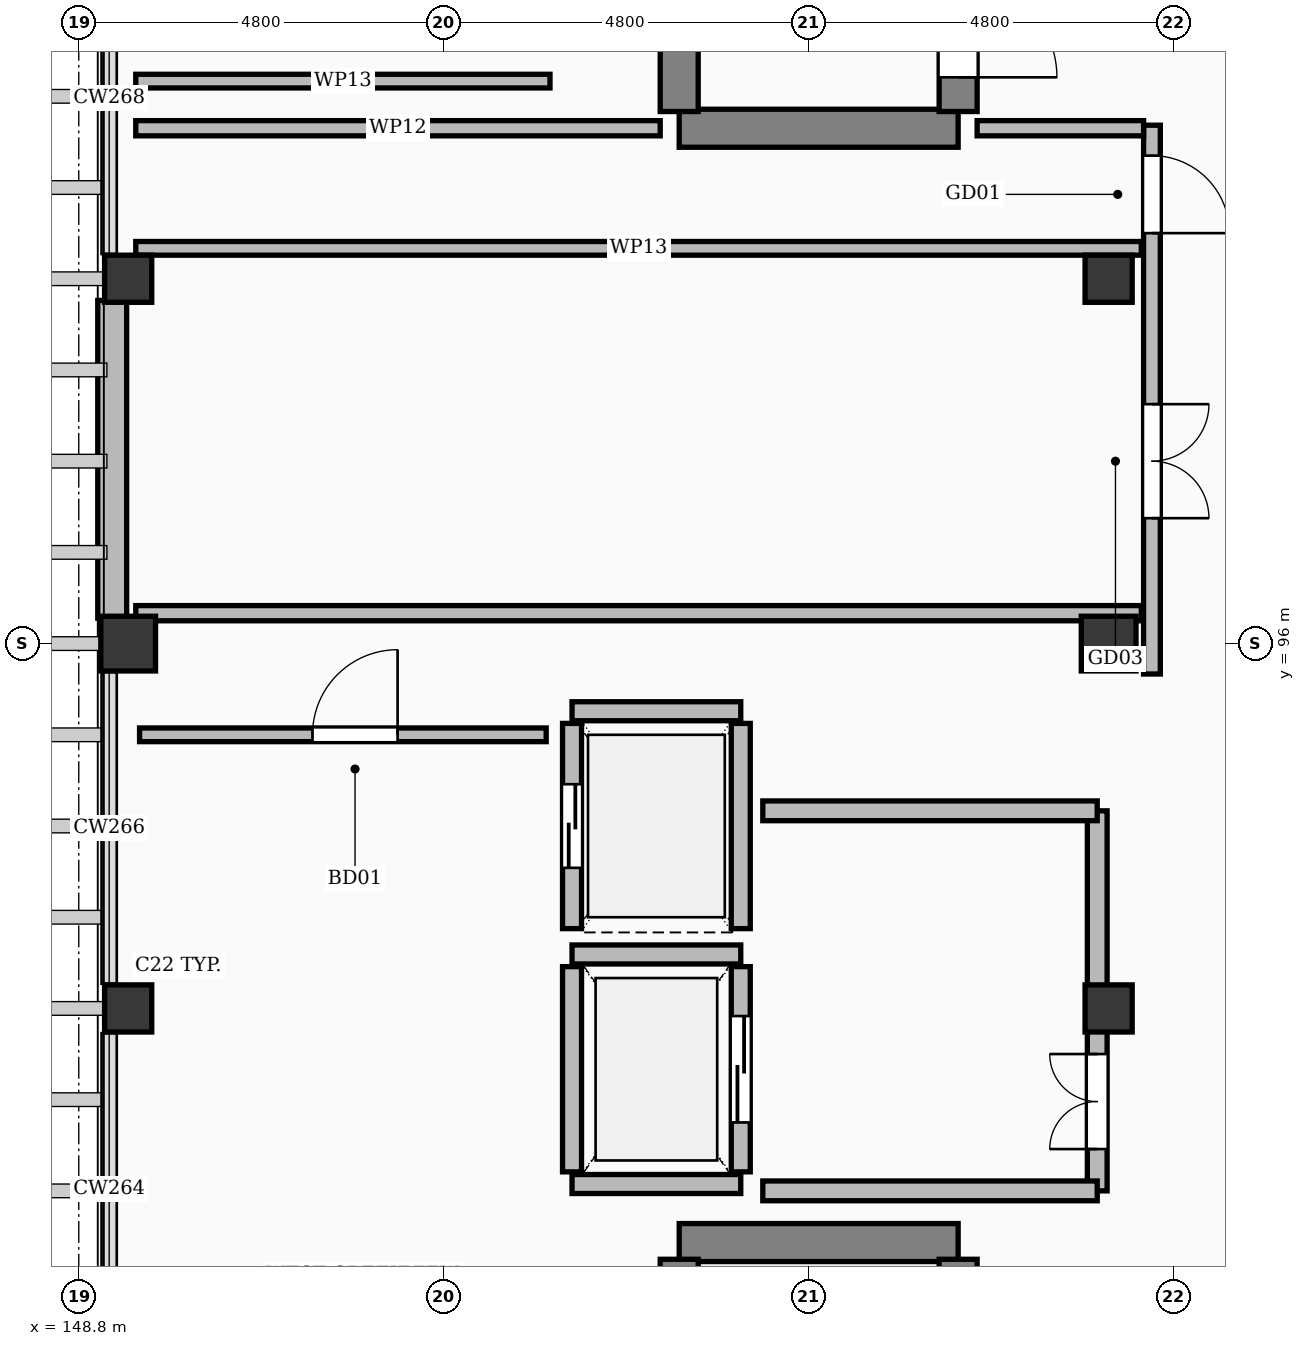
"""IFC4 building model, lengths in metres.
Left out: names, types, materials, properties, quantities, classifications, styles, units other than length and angle.
Written with IfcOpenShell. Run it as: python <this file> out.ifc"""

import sys

from ifc_helpers import new_model, si_unit, direction, frame, frame_2d, origin, origin_2d, place, context, subcontext, project, spatial, rectangle, extrude, element, fill, save


model = new_model("IFC4")
c1 = context("Model", 3, precision=1e-05, world=origin(), true_north=direction((0.0, 1.0)))
c2 = subcontext(c1, "Body", "Model", "MODEL_VIEW")
j1 = project(units=[si_unit("LENGTHUNIT", "METRE"), si_unit("PLANEANGLEUNIT", "RADIAN")], contexts=[c1])
p1 = place(None, origin())
s1 = spatial("IfcSite", under=j1, at=p1, CompositionType="ELEMENT")
p2 = place(p1, origin())
s2 = spatial("IfcBuilding", under=s1, at=p2, CompositionType="ELEMENT")
p3 = place(p2, frame((0.0, 0.0, 31.8)))
s3 = spatial("IfcBuildingStorey", under=s2, at=p3, CompositionType="ELEMENT", Elevation=31.8)
for number, where, z_axis, x_axis in (
    (1, (149.45, 96.0, 0.0), (0.0, 0.0, 1.0), (1.0, 0.0, 0.0)),
    (2, (162.35, 96.0, 0.0), (0.0, 0.0, 1.0), (1.0, 0.0, 0.0)),
):
    element("IfcColumn", number, at=place(p3, frame(where, z_axis=z_axis, x_axis=x_axis)), inside=s3, PredefinedType="COLUMN", context=c2, shape_type="SweptSolid", body=[
        extrude(rectangle(XDim=0.72, YDim=0.72, at=origin_2d()), origin(), (0.0, 0.0, 1.0), 3.6),
    ])
for number, where, z_axis, x_axis in (
    (3, (149.45, 91.2, 0.0), (0.0, 0.0, 1.0), (1.0, 0.0, 0.0)),
    (4, (149.45, 100.8, 0.0), (0.0, 0.0, 1.0), (1.0, 0.0, 0.0)),
    (5, (162.35, 91.2, 0.0), (0.0, 0.0, 1.0), (1.0, 0.0, 0.0)),
    (6, (162.35, 100.8, 0.0), (0.0, 0.0, 1.0), (1.0, 0.0, 0.0)),
):
    element("IfcColumn", number, at=place(p3, frame(where, z_axis=z_axis, x_axis=x_axis)), inside=s3, PredefinedType="COLUMN", context=c2, shape_type="SweptSolid", body=[
        extrude(rectangle(XDim=0.62, YDim=0.62, at=origin_2d()), origin(), (0.0, 0.0, 1.0), 3.6),
    ])
p4 = place(p3, frame((149.24, 96.335, 0.0), z_axis=(0.0, 0.0, 1.0), x_axis=(0.0, 1.0, 0.0)))
e7 = element("IfcWall", 7, at=p4, inside=s3, PredefinedType="SOLIDWALL", context=c2, shape_type="SweptSolid", body=[
    extrude(rectangle(XDim=4.18, YDim=0.38, at=frame_2d((2.09, 0.0))), origin(), (0.0, 0.0, 1.0), 2.732),
])
p5 = place(p3, frame((156.7, 88.12, 0.0), z_axis=(0.0, 0.0, 1.0), x_axis=(1.0, 0.0, 0.0)))
e8 = element("IfcWall", 8, at=p5, inside=s3, PredefinedType="SHEAR", context=c2, shape_type="SweptSolid", body=[
    extrude(rectangle(XDim=3.67, YDim=0.5, at=frame_2d((1.835, 0.0))), origin(), (0.0, 0.0, 1.0), 3.36),
])
p6 = place(p3, frame((156.7, 77.4, 0.0), z_axis=(0.0, 0.0, 1.0), x_axis=(0.0, 1.0, 0.0)))
e9 = element("IfcWall", 9, at=p6, inside=s3, PredefinedType="SHEAR", context=c2, shape_type="SweptSolid", body=[
    extrude(rectangle(XDim=10.5, YDim=0.5, at=frame_2d((5.25, 0.0))), origin(), (0.0, 0.0, 1.0), 3.36),
])
p7 = place(p3, frame((160.37, 77.4, 0.0), z_axis=(0.0, 0.0, 1.0), x_axis=(0.0, 1.0, 0.0)))
e10 = element("IfcWall", 10, at=p7, inside=s3, PredefinedType="SHEAR", context=c2, shape_type="SweptSolid", body=[
    extrude(rectangle(XDim=10.5, YDim=0.5, at=frame_2d((5.25, 0.0))), origin(), (0.0, 0.0, 1.0), 3.36),
])
p8 = place(p7, frame((0.45, 0.0, 0.0)))
e11 = element("IfcOpeningElement", 11, at=p8, cuts=e10, PredefinedType="OPENING", context=c2, shape_type="SweptSolid", body=[
    extrude(rectangle(XDim=1.3, YDim=2.15, at=frame_2d((0.65, 1.075))), frame((0.0, 0.262, 0.0), z_axis=(0.0, -1.0, 0.0), x_axis=(1.0, 0.0, 0.0)), (0.0, 0.0, 1.0), 0.524),
])
for number, where, z_axis, x_axis in (
    (12, (155.29, 88.89, 0.0), (0.0, 0.0, 1.0), (1.0, 0.0, 0.0)),
    (13, (155.29, 91.91, 0.0), (0.0, 0.0, 1.0), (1.0, 0.0, 0.0)),
):
    element("IfcWall", number, at=place(p3, frame(where, z_axis=z_axis, x_axis=x_axis)), inside=s3, PredefinedType="SOLIDWALL", context=c2, shape_type="SweptSolid", body=[
        extrude(rectangle(XDim=2.22, YDim=0.25, at=frame_2d((1.11, 0.0))), origin(), (0.0, 0.0, 1.0), 3.36),
    ])
p9 = place(p3, frame((155.29, 89.05, 0.0), z_axis=(0.0, 0.0, 1.0), x_axis=(0.0, 1.0, 0.0)))
e14 = element("IfcWall", 14, at=p9, inside=s3, PredefinedType="SOLIDWALL", context=c2, shape_type="SweptSolid", body=[
    extrude(rectangle(XDim=2.7, YDim=0.25, at=frame_2d((1.35, 0.0))), origin(), (0.0, 0.0, 1.0), 2.732),
])
p10 = place(p3, frame((157.51, 89.05, 0.0), z_axis=(0.0, 0.0, 1.0), x_axis=(0.0, 1.0, 0.0)))
e15 = element("IfcWall", 15, at=p10, inside=s3, PredefinedType="SOLIDWALL", context=c2, shape_type="SweptSolid", body=[
    extrude(rectangle(XDim=2.7, YDim=0.25, at=frame_2d((1.35, 0.0))), origin(), (0.0, 0.0, 1.0), 2.732),
])
p11 = place(p10, frame((0.65, 0.0, 0.0)))
e16 = element("IfcOpeningElement", 16, at=p11, cuts=e15, PredefinedType="OPENING", context=c2, shape_type="SweptSolid", body=[
    extrude(rectangle(XDim=1.4, YDim=2.3, at=frame_2d((0.7, 1.15))), frame((0.0, 0.137, 0.0), z_axis=(0.0, -1.0, 0.0), x_axis=(1.0, 0.0, 0.0)), (0.0, 0.0, 1.0), 0.274),
])
p12 = place(p3, frame((155.29, 95.11, 0.0), z_axis=(0.0, 0.0, 1.0), x_axis=(1.0, 0.0, 0.0)))
e17 = element("IfcWall", 17, at=p12, inside=s3, PredefinedType="SOLIDWALL", context=c2, shape_type="SweptSolid", body=[
    extrude(rectangle(XDim=2.22, YDim=0.25, at=frame_2d((1.11, 0.0))), origin(), (0.0, 0.0, 1.0), 3.36),
])
p13 = place(p3, frame((155.29, 92.25, 0.0), z_axis=(0.0, 0.0, 1.0), x_axis=(0.0, 1.0, 0.0)))
e18 = element("IfcWall", 18, at=p13, inside=s3, PredefinedType="SOLIDWALL", context=c2, shape_type="SweptSolid", body=[
    extrude(rectangle(XDim=2.7, YDim=0.25, at=frame_2d((1.35, 0.0))), origin(), (0.0, 0.0, 1.0), 3.36),
])
p14 = place(p13, frame((0.8, 0.0, 0.0)))
e19 = element("IfcOpeningElement", 19, at=p14, cuts=e18, PredefinedType="OPENING", context=c2, shape_type="SweptSolid", body=[
    extrude(rectangle(XDim=1.1, YDim=2.2, at=frame_2d((0.55, 1.1))), frame((0.0, 0.137, 0.0), z_axis=(0.0, -1.0, 0.0), x_axis=(1.0, 0.0, 0.0)), (0.0, 0.0, 1.0), 0.274),
])
p15 = place(p3, frame((157.51, 92.25, 0.0), z_axis=(0.0, 0.0, 1.0), x_axis=(0.0, 1.0, 0.0)))
e20 = element("IfcWall", 20, at=p15, inside=s3, PredefinedType="SOLIDWALL", context=c2, shape_type="SweptSolid", body=[
    extrude(rectangle(XDim=2.7, YDim=0.25, at=frame_2d((1.35, 0.0))), origin(), (0.0, 0.0, 1.0), 3.36),
])
p16 = place(p3, frame((162.2, 88.8, 0.0), z_axis=(0.0, 0.0, 1.0), x_axis=(0.0, 1.0, 0.0)))
e21 = element("IfcWall", 21, at=p16, inside=s3, PredefinedType="SOLIDWALL", context=c2, shape_type="SweptSolid", body=[
    extrude(rectangle(XDim=5.0, YDim=0.26, at=frame_2d((2.5, 0.0))), origin(), (0.0, 0.0, 1.0), 2.732),
])
p17 = place(p16, frame((0.55, 0.0, 0.0)))
e22 = element("IfcOpeningElement", 22, at=p17, cuts=e21, PredefinedType="OPENING", context=c2, shape_type="SweptSolid", body=[
    extrude(rectangle(XDim=1.25, YDim=2.15, at=frame_2d((0.625, 1.075))), frame((0.0, 0.142, 0.0), z_axis=(0.0, -1.0, 0.0), x_axis=(1.0, 0.0, 0.0)), (0.0, 0.0, 1.0), 0.284),
])
for number, where, z_axis, x_axis in (
    (23, (157.8, 88.8, 0.0), (0.0, 0.0, 1.0), (1.0, 0.0, 0.0)),
    (24, (157.8, 93.8, 0.0), (0.0, 0.0, 1.0), (1.0, 0.0, 0.0)),
):
    element("IfcWall", number, at=place(p3, frame(where, z_axis=z_axis, x_axis=x_axis)), inside=s3, PredefinedType="SOLIDWALL", context=c2, shape_type="SweptSolid", body=[
        extrude(rectangle(XDim=4.4, YDim=0.26, at=frame_2d((2.2, 0.0))), origin(), (0.0, 0.0, 1.0), 2.732),
    ])
p18 = place(p3, frame((156.7, 102.78, 0.0), z_axis=(0.0, 0.0, 1.0), x_axis=(1.0, 0.0, 0.0)))
e25 = element("IfcWall", 25, at=p18, inside=s3, PredefinedType="SHEAR", context=c2, shape_type="SweptSolid", body=[
    extrude(rectangle(XDim=3.67, YDim=0.5, at=frame_2d((1.835, 0.0))), origin(), (0.0, 0.0, 1.0), 3.36),
])
p19 = place(p3, frame((156.7, 103.0, 0.0), z_axis=(0.0, 0.0, 1.0), x_axis=(0.0, 1.0, 0.0)))
e26 = element("IfcWall", 26, at=p19, inside=s3, PredefinedType="SHEAR", context=c2, shape_type="SweptSolid", body=[
    extrude(rectangle(XDim=10.5, YDim=0.5, at=frame_2d((5.25, 0.0))), origin(), (0.0, 0.0, 1.0), 3.36),
])
p20 = place(p3, frame((160.37, 103.0, 0.0), z_axis=(0.0, 0.0, 1.0), x_axis=(0.0, 1.0, 0.0)))
e27 = element("IfcWall", 27, at=p20, inside=s3, PredefinedType="SHEAR", context=c2, shape_type="SweptSolid", body=[
    extrude(rectangle(XDim=10.5, YDim=0.5, at=frame_2d((5.25, 0.0))), origin(), (0.0, 0.0, 1.0), 3.36),
])
p21 = place(p20, frame((0.45, 0.0, 0.0)))
e28 = element("IfcOpeningElement", 28, at=p21, cuts=e27, PredefinedType="OPENING", context=c2, shape_type="SweptSolid", body=[
    extrude(rectangle(XDim=1.3, YDim=2.15, at=frame_2d((0.65, 1.075))), frame((0.0, 0.262, 0.0), z_axis=(0.0, -1.0, 0.0), x_axis=(1.0, 0.0, 0.0)), (0.0, 0.0, 1.0), 0.524),
])
p22 = place(p3, frame((162.92, 95.6, 0.0), z_axis=(0.0, 0.0, 1.0), x_axis=(0.0, 1.0, 0.0)))
e29 = element("IfcWall", 29, at=p22, inside=s3, PredefinedType="PARTITIONING", context=c2, shape_type="SweptSolid", body=[
    extrude(rectangle(XDim=7.22, YDim=0.22, at=frame_2d((3.61, 0.0))), origin(), (0.0, 0.0, 1.0), 2.732),
])
p23 = place(p22, frame((2.05, 0.0, 0.0)))
e30 = element("IfcOpeningElement", 30, at=p23, cuts=e29, PredefinedType="OPENING", context=c2, shape_type="SweptSolid", body=[
    extrude(rectangle(XDim=1.5, YDim=2.3, at=frame_2d((0.75, 1.15))), frame((0.0, 0.122, 0.0), z_axis=(0.0, -1.0, 0.0), x_axis=(1.0, 0.0, 0.0)), (0.0, 0.0, 1.0), 0.244),
])
p24 = place(p22, frame((5.8, 0.0, 0.0)))
e31 = element("IfcOpeningElement", 31, at=p24, cuts=e29, PredefinedType="OPENING", context=c2, shape_type="SweptSolid", body=[
    extrude(rectangle(XDim=1.02, YDim=2.2, at=frame_2d((0.51, 1.1))), frame((0.0, 0.122, 0.0), z_axis=(0.0, -1.0, 0.0), x_axis=(1.0, 0.0, 0.0)), (0.0, 0.0, 1.0), 0.244),
])
p25 = place(p3, frame((149.55, 96.4, 0.0), z_axis=(0.0, 0.0, 1.0), x_axis=(1.0, 0.0, 0.0)))
e32 = element("IfcWall", 32, at=p25, inside=s3, PredefinedType="PARTITIONING", context=c2, shape_type="SweptSolid", body=[
    extrude(rectangle(XDim=13.23, YDim=0.2, at=frame_2d((6.615, 0.0))), origin(), (0.0, 0.0, 1.0), 2.732),
])
p26 = place(p3, frame((149.55, 101.2, 0.0), z_axis=(0.0, 0.0, 1.0), x_axis=(1.0, 0.0, 0.0)))
e33 = element("IfcWall", 33, at=p26, inside=s3, PredefinedType="PARTITIONING", context=c2, shape_type="SweptSolid", body=[
    extrude(rectangle(XDim=13.23, YDim=0.18, at=frame_2d((6.615, 0.0))), origin(), (0.0, 0.0, 1.0), 2.732),
])
p27 = place(p3, frame((149.55, 102.78, 0.0), z_axis=(0.0, 0.0, 1.0), x_axis=(1.0, 0.0, 0.0)))
e34 = element("IfcWall", 34, at=p27, inside=s3, PredefinedType="PARTITIONING", context=c2, shape_type="SweptSolid", body=[
    extrude(rectangle(XDim=6.9, YDim=0.2, at=frame_2d((3.45, 0.0))), origin(), (0.0, 0.0, 1.0), 2.732),
])
p28 = place(p3, frame((160.62, 102.78, 0.0), z_axis=(0.0, 0.0, 1.0), x_axis=(1.0, 0.0, 0.0)))
e35 = element("IfcWall", 35, at=p28, inside=s3, PredefinedType="PARTITIONING", context=c2, shape_type="SweptSolid", body=[
    extrude(rectangle(XDim=2.19, YDim=0.2, at=frame_2d((1.095, 0.0))), origin(), (0.0, 0.0, 1.0), 2.732),
])
p29 = place(p3, frame((149.6, 94.8, 0.0), z_axis=(0.0, 0.0, 1.0), x_axis=(1.0, 0.0, 0.0)))
e36 = element("IfcWall", 36, at=p29, inside=s3, PredefinedType="PARTITIONING", context=c2, shape_type="SweptSolid", body=[
    extrude(rectangle(XDim=5.35, YDim=0.18, at=frame_2d((2.675, 0.0))), origin(), (0.0, 0.0, 1.0), 2.732),
])
p30 = place(p29, frame((2.275, 0.0, 0.0)))
e37 = element("IfcOpeningElement", 37, at=p30, cuts=e36, PredefinedType="OPENING", context=c2, shape_type="SweptSolid", body=[
    extrude(rectangle(XDim=1.12, YDim=2.15, at=frame_2d((0.56, 1.075))), frame((0.0, 0.102, 0.0), z_axis=(0.0, -1.0, 0.0), x_axis=(1.0, 0.0, 0.0)), (0.0, 0.0, 1.0), 0.204),
])
p31 = place(p3, frame((149.55, 103.4, 0.0), z_axis=(0.0, 0.0, 1.0), x_axis=(1.0, 0.0, 0.0)))
e38 = element("IfcWall", 38, at=p31, inside=s3, PredefinedType="PARTITIONING", context=c2, shape_type="SweptSolid", body=[
    extrude(rectangle(XDim=5.45, YDim=0.18, at=frame_2d((2.725, 0.0))), origin(), (0.0, 0.0, 1.0), 2.732),
])
p32 = place(p11, origin())
e39 = element("IfcDoor", 39, at=p32, inside=s3, OperationType="SLIDING_TO_LEFT", PredefinedType="DOOR", context=c2, shape_type="SweptSolid", body=[
    extrude(rectangle(XDim=1.4, YDim=2.3, at=frame_2d((0.7, 1.15))), frame((0.0, 0.025, 0.0), z_axis=(0.0, -1.0, 0.0), x_axis=(1.0, 0.0, 0.0)), (0.0, 0.0, 1.0), 0.05),
])
fill(e16, e39)
p33 = place(p14, origin())
e40 = element("IfcDoor", 40, at=p33, inside=s3, OperationType="SLIDING_TO_LEFT", PredefinedType="DOOR", context=c2, shape_type="SweptSolid", body=[
    extrude(rectangle(XDim=1.1, YDim=2.2, at=frame_2d((0.55, 1.1))), frame((0.0, 0.025, 0.0), z_axis=(0.0, -1.0, 0.0), x_axis=(1.0, 0.0, 0.0)), (0.0, 0.0, 1.0), 0.05),
])
fill(e19, e40)
p34 = place(p17, origin())
e41 = element("IfcDoor", 41, at=p34, inside=s3, OperationType="DOUBLE_DOOR_SINGLE_SWING", PredefinedType="DOOR", context=c2, shape_type="SweptSolid", body=[
    extrude(rectangle(XDim=1.25, YDim=2.15, at=frame_2d((0.625, 1.075))), frame((0.0, 0.025, 0.0), z_axis=(0.0, -1.0, 0.0), x_axis=(1.0, 0.0, 0.0)), (0.0, 0.0, 1.0), 0.05),
])
fill(e22, e41)
p35 = place(p21, frame((1.3, 0.0, 0.0), z_axis=(0.0, 0.0, 1.0), x_axis=(-1.0, 0.0, 0.0)))
e42 = element("IfcDoor", 42, at=p35, inside=s3, OperationType="SINGLE_SWING_LEFT", PredefinedType="DOOR", context=c2, shape_type="SweptSolid", body=[
    extrude(rectangle(XDim=1.3, YDim=2.15, at=frame_2d((0.65, 1.075))), frame((0.0, 0.025, 0.0), z_axis=(0.0, -1.0, 0.0), x_axis=(1.0, 0.0, 0.0)), (0.0, 0.0, 1.0), 0.05),
])
fill(e28, e42)
p36 = place(p23, frame((1.5, 0.0, 0.0), z_axis=(0.0, 0.0, 1.0), x_axis=(-1.0, 0.0, 0.0)))
e43 = element("IfcDoor", 43, at=p36, inside=s3, OperationType="DOUBLE_DOOR_SINGLE_SWING", PredefinedType="DOOR", context=c2, shape_type="SweptSolid", body=[
    extrude(rectangle(XDim=1.5, YDim=2.3, at=frame_2d((0.75, 1.15))), frame((0.0, 0.025, 0.0), z_axis=(0.0, -1.0, 0.0), x_axis=(1.0, 0.0, 0.0)), (0.0, 0.0, 1.0), 0.05),
])
fill(e30, e43)
p37 = place(p24, frame((1.02, 0.0, 0.0), z_axis=(0.0, 0.0, 1.0), x_axis=(-1.0, 0.0, 0.0)))
e44 = element("IfcDoor", 44, at=p37, inside=s3, OperationType="SINGLE_SWING_LEFT", PredefinedType="DOOR", context=c2, shape_type="SweptSolid", body=[
    extrude(rectangle(XDim=1.02, YDim=2.2, at=frame_2d((0.51, 1.1))), frame((0.0, 0.025, 0.0), z_axis=(0.0, -1.0, 0.0), x_axis=(1.0, 0.0, 0.0)), (0.0, 0.0, 1.0), 0.05),
])
fill(e31, e44)
p38 = place(p30, origin())
e45 = element("IfcDoor", 45, at=p38, inside=s3, OperationType="SINGLE_SWING_RIGHT", PredefinedType="DOOR", context=c2, shape_type="SweptSolid", body=[
    extrude(rectangle(XDim=1.12, YDim=2.15, at=frame_2d((0.56, 1.075))), frame((0.0, 0.025, 0.0), z_axis=(0.0, -1.0, 0.0), x_axis=(1.0, 0.0, 0.0)), (0.0, 0.0, 1.0), 0.05),
])
fill(e37, e45)
save(model, sys.argv[1])
